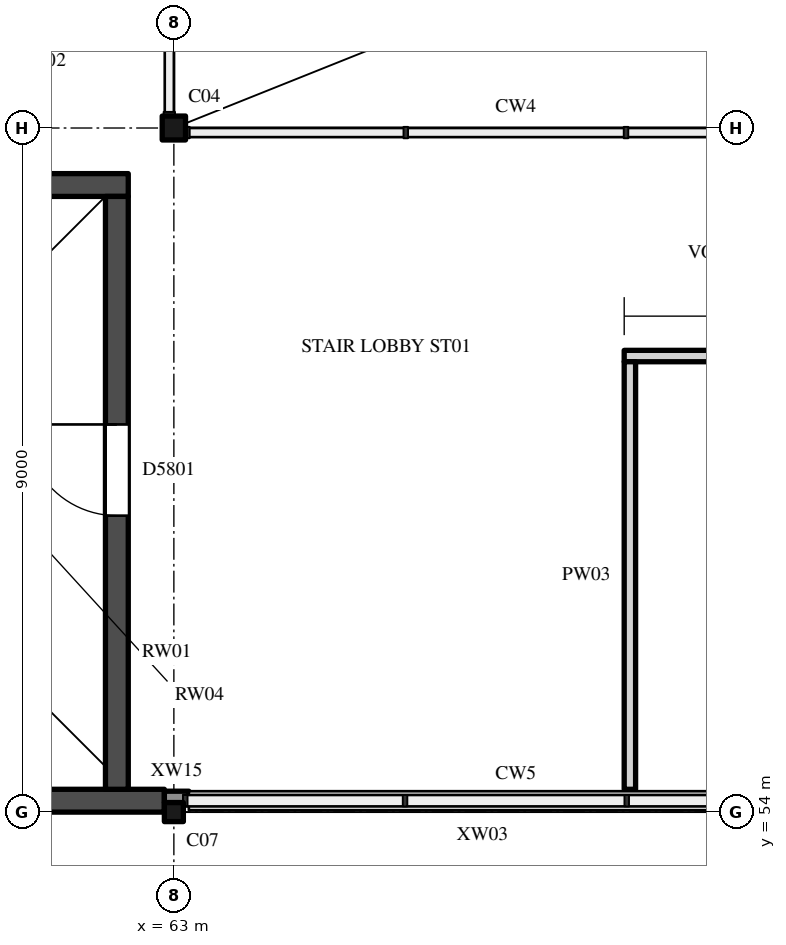
"""IFC4 building model, lengths in metres.
Left out: names, types, materials, properties, quantities, classifications, styles, units other than length and angle.
Written with IfcOpenShell. Run it as: python <this file> out.ifc"""

import sys

from ifc_helpers import new_model, si_unit, direction, frame, frame_2d, origin, origin_2d, place, context, subcontext, project, spatial, rectangle, hollow_rectangle, i_section, extrude, element, fill, save


model = new_model("IFC4")
c1 = context("Model", 3, precision=1e-05, world=origin(), true_north=direction((0.0, 1.0)))
c2 = subcontext(c1, "Body", "Model", "MODEL_VIEW")
j1 = project(units=[si_unit("LENGTHUNIT", "METRE"), si_unit("PLANEANGLEUNIT", "RADIAN")], contexts=[c1])
p1 = place(None, origin())
s1 = spatial("IfcSite", under=j1, at=p1, CompositionType="ELEMENT")
p2 = place(p1, origin())
s2 = spatial("IfcBuilding", under=s1, at=p2, CompositionType="ELEMENT")
p3 = place(p2, frame((0.0, 0.0, 31.0)))
s3 = spatial("IfcBuildingStorey", under=s2, at=p3, CompositionType="ELEMENT", Elevation=31.0)
p4 = place(p3, frame((63.0, 54.0, 0.0), z_axis=(0.0, 0.0, 1.0), x_axis=(1.0, 0.0, 0.0)))
e1 = element("IfcColumn", 1, at=p4, inside=s3, PredefinedType="COLUMN", context=c2, shape_type="SweptSolid", body=[
    extrude(hollow_rectangle(XDim=0.25, YDim=0.25, WallThickness=0.009, InnerFilletRadius=0.013, OuterFilletRadius=0.022, at=origin_2d()), origin(), (0.0, 0.0, 1.0), 5.0),
])
p5 = place(p3, frame((63.0, 63.0, 0.0), z_axis=(0.0, 0.0, 1.0), x_axis=(1.0, 0.0, 0.0)))
e2 = element("IfcColumn", 2, at=p5, inside=s3, PredefinedType="COLUMN", context=c2, shape_type="SweptSolid", body=[
    extrude(i_section(OverallWidth=0.307, OverallDepth=0.315, WebThickness=0.012, FlangeThickness=0.019, FilletRadius=0.017, at=origin_2d()), origin(), (0.0, 0.0, 1.0), 5.0),
])
p6 = place(p3, frame((54.3, 54.15, 0.0), z_axis=(0.0, 0.0, 1.0), x_axis=(1.0, 0.0, 0.0)))
e3 = element("IfcWall", 3, at=p6, inside=s3, PredefinedType="SHEAR", context=c2, shape_type="SweptSolid", body=[
    extrude(rectangle(XDim=8.575, YDim=0.3, at=frame_2d((4.288, 0.0))), origin(), (0.0, 0.0, 1.0), 5.0),
])
p7 = place(p3, frame((54.3, 62.25, 0.0), z_axis=(0.0, 0.0, 1.0), x_axis=(1.0, 0.0, 0.0)))
e4 = element("IfcWall", 4, at=p7, inside=s3, PredefinedType="SHEAR", context=c2, shape_type="SweptSolid", body=[
    extrude(rectangle(XDim=8.1, YDim=0.3, at=frame_2d((4.05, 0.0))), origin(), (0.0, 0.0, 1.0), 5.0),
])
p8 = place(p3, frame((62.25, 54.3, 0.0), z_axis=(0.0, 0.0, 1.0), x_axis=(0.0, 1.0, 0.0)))
e5 = element("IfcWall", 5, at=p8, inside=s3, PredefinedType="SHEAR", context=c2, shape_type="SweptSolid", body=[
    extrude(rectangle(XDim=7.8, YDim=0.3, at=frame_2d((3.9, 0.0))), origin(), (0.0, 0.0, 1.0), 5.0),
])
p9 = place(p8, frame((3.6, 0.0, 0.0)))
e6 = element("IfcOpeningElement", 6, at=p9, cuts=e5, PredefinedType="OPENING", context=c2, shape_type="SweptSolid", body=[
    extrude(rectangle(XDim=1.2, YDim=2.1, at=frame_2d((0.6, 1.05))), frame((0.0, 0.16, 0.0), z_axis=(0.0, -1.0, 0.0), x_axis=(1.0, 0.0, 0.0)), (0.0, 0.0, 1.0), 0.32),
])
p10 = place(p3, frame((63.197, 54.15, 0.0), z_axis=(0.0, 0.0, 1.0), x_axis=(1.0, 0.0, 0.0)))
e7 = element("IfcWall", 7, at=p10, inside=s3, PredefinedType="SOLIDWALL", context=c2, shape_type="SweptSolid", body=[
    extrude(rectangle(XDim=8.642, YDim=0.25, at=frame_2d((4.321, 0.0))), origin(), (0.0, 0.0, 1.0), 1.1),
])
p11 = place(p3, frame((62.875, 54.2, 0.0), z_axis=(0.0, 0.0, 1.0), x_axis=(1.0, 0.0, 0.0)))
e8 = element("IfcWall", 8, at=p11, inside=s3, PredefinedType="SOLIDWALL", context=c2, shape_type="SweptSolid", body=[
    extrude(rectangle(XDim=0.322, YDim=0.15, at=frame_2d((0.161, 0.0))), origin(), (0.0, 0.0, 1.0), 5.0),
])
p12 = place(p3, frame((68.925, 60.0, 0.0), z_axis=(0.0, 0.0, 1.0), x_axis=(1.0, 0.0, 0.0)))
e9 = element("IfcWall", 9, at=p12, inside=s3, PredefinedType="PARTITIONING", context=c2, shape_type="SweptSolid", body=[
    extrude(rectangle(XDim=33.15, YDim=0.15, at=frame_2d((16.575, 0.0))), origin(), (0.0, 0.0, 1.0), 4.521),
])
p13 = place(p12, frame((9.825, 0.0, 0.0)))
e10 = element("IfcOpeningElement", 10, at=p13, cuts=e9, PredefinedType="OPENING", context=c2, shape_type="SweptSolid", body=[
    extrude(rectangle(XDim=1.5, YDim=2.4, at=frame_2d((0.75, 1.2))), frame((0.0, 0.085, 0.0), z_axis=(0.0, -1.0, 0.0), x_axis=(1.0, 0.0, 0.0)), (0.0, 0.0, 1.0), 0.17),
])
p14 = place(p12, frame((26.425, 0.0, 0.0)))
e11 = element("IfcOpeningElement", 11, at=p14, cuts=e9, PredefinedType="OPENING", context=c2, shape_type="SweptSolid", body=[
    extrude(rectangle(XDim=1.2, YDim=2.4, at=frame_2d((0.6, 1.2))), frame((0.0, 0.085, 0.0), z_axis=(0.0, -1.0, 0.0), x_axis=(1.0, 0.0, 0.0)), (0.0, 0.0, 1.0), 0.17),
])
p15 = place(p3, frame((69.0, 54.3, 0.0), z_axis=(0.0, 0.0, 1.0), x_axis=(0.0, 1.0, 0.0)))
e12 = element("IfcWall", 12, at=p15, inside=s3, PredefinedType="PARTITIONING", context=c2, shape_type="SweptSolid", body=[
    extrude(rectangle(XDim=5.625, YDim=0.15, at=frame_2d((2.812, 0.0))), origin(), (0.0, 0.0, 1.0), 4.825),
])
p16 = place(p9, origin())
e13 = element("IfcDoor", 13, at=p16, inside=s3, OperationType="SINGLE_SWING_LEFT", PredefinedType="DOOR", context=c2, shape_type="SweptSolid", body=[
    extrude(rectangle(XDim=1.2, YDim=2.1, at=frame_2d((0.6, 1.05))), frame((0.0, 0.025, 0.0), z_axis=(0.0, -1.0, 0.0), x_axis=(1.0, 0.0, 0.0)), (0.0, 0.0, 1.0), 0.05),
])
fill(e6, e13)
save(model, sys.argv[1])
